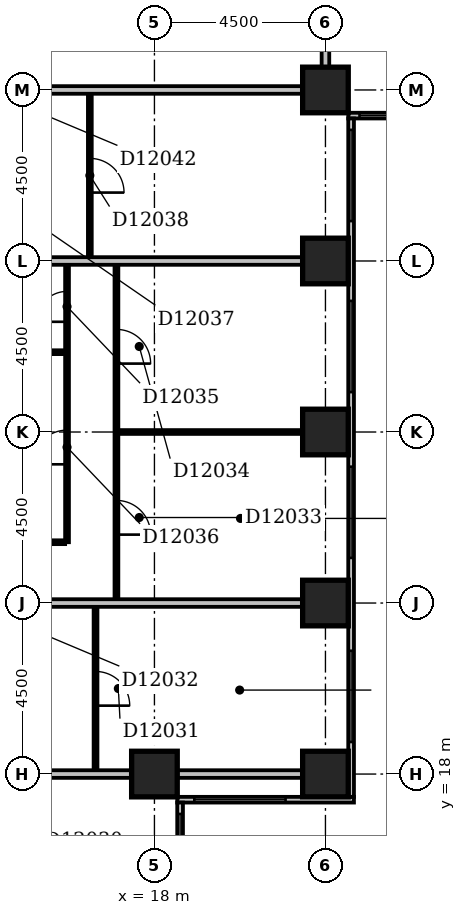
"""IFC4 building model, lengths in metres.
Left out: names, types, materials, properties, quantities, classifications, styles, units other than length and angle.
Written with IfcOpenShell. Run it as: python <this file> out.ifc"""

import sys

from ifc_helpers import new_model, si_unit, direction, frame, frame_2d, origin, origin_2d, place, context, subcontext, project, spatial, rectangle, extrude, element, fill, save


model = new_model("IFC4")
c1 = context("Model", 3, precision=1e-05, world=origin(), true_north=direction((0.0, 1.0)))
c2 = subcontext(c1, "Body", "Model", "MODEL_VIEW")
j1 = project(units=[si_unit("LENGTHUNIT", "METRE"), si_unit("PLANEANGLEUNIT", "RADIAN")], contexts=[c1])
p1 = place(None, origin())
s1 = spatial("IfcSite", under=j1, at=p1, CompositionType="ELEMENT")
p2 = place(p1, origin())
s2 = spatial("IfcBuilding", under=s1, at=p2, CompositionType="ELEMENT")
p3 = place(p2, frame((0.0, 0.0, 54.2)))
s3 = spatial("IfcBuildingStorey", under=s2, at=p3, CompositionType="ELEMENT", Elevation=54.2)
for number, where, z_axis, x_axis in (
    (1, (18.0, 18.0, -0.3), (0.0, 0.0, 1.0), (1.0, 0.0, 0.0)),
    (2, (22.5, 18.0, -0.3), (0.0, 0.0, 1.0), (1.0, 0.0, 0.0)),
    (3, (22.5, 22.5, -0.3), (0.0, 0.0, 1.0), (1.0, 0.0, 0.0)),
    (4, (22.5, 27.0, -0.3), (0.0, 0.0, 1.0), (1.0, 0.0, 0.0)),
    (5, (22.5, 31.5, -0.3), (0.0, 0.0, 1.0), (1.0, 0.0, 0.0)),
    (6, (22.5, 36.0, -0.3), (0.0, 0.0, 1.0), (1.0, 0.0, 0.0)),
):
    element("IfcColumn", number, at=place(p3, frame(where, z_axis=z_axis, x_axis=x_axis)), inside=s3, PredefinedType="COLUMN", context=c2, shape_type="SweptSolid", body=[
        extrude(rectangle(XDim=1.2, YDim=1.2, at=origin_2d()), origin(), (0.0, 0.0, 1.0), 3.6),
    ])
p4 = place(p3, frame((18.675, 8.4, 0.0), z_axis=(0.0, 0.0, 1.0), x_axis=(0.0, 1.0, 0.0)))
e7 = element("IfcWall", 7, at=p4, inside=s3, PredefinedType="STANDARD", context=c2, shape_type="SweptSolid", body=[
    extrude(rectangle(XDim=8.85, YDim=0.15, at=frame_2d((4.425, 0.0))), origin(), (0.0, 0.0, 1.0), 2.7),
])
p5 = place(p4, frame((1.461, 0.0, 0.6)))
e8 = element("IfcOpeningElement", 8, at=p5, cuts=e7, PredefinedType="OPENING", context=c2, shape_type="SweptSolid", body=[
    extrude(rectangle(XDim=0.45, YDim=1.8, at=frame_2d((0.225, 0.9))), frame((0.0, 0.087, 0.0), z_axis=(0.0, -1.0, 0.0), x_axis=(1.0, 0.0, 0.0)), (0.0, 0.0, 1.0), 0.174),
])
p6 = place(p4, frame((3.391, 0.0, 0.6)))
e9 = element("IfcOpeningElement", 9, at=p6, cuts=e7, PredefinedType="OPENING", context=c2, shape_type="SweptSolid", body=[
    extrude(rectangle(XDim=0.9, YDim=1.8, at=frame_2d((0.45, 0.9))), frame((0.0, 0.087, 0.0), z_axis=(0.0, -1.0, 0.0), x_axis=(1.0, 0.0, 0.0)), (0.0, 0.0, 1.0), 0.174),
])
p7 = place(p4, frame((6.15, 0.0, 0.6)))
e10 = element("IfcOpeningElement", 10, at=p7, cuts=e7, PredefinedType="OPENING", context=c2, shape_type="SweptSolid", body=[
    extrude(rectangle(XDim=2.4, YDim=1.8, at=frame_2d((1.2, 0.9))), frame((0.0, 0.087, 0.0), z_axis=(0.0, -1.0, 0.0), x_axis=(1.0, 0.0, 0.0)), (0.0, 0.0, 1.0), 0.174),
])
p8 = place(p3, frame((18.6, 17.325, 0.0), z_axis=(0.0, 0.0, 1.0), x_axis=(1.0, 0.0, 0.0)))
e11 = element("IfcWall", 11, at=p8, inside=s3, PredefinedType="STANDARD", context=c2, shape_type="SweptSolid", body=[
    extrude(rectangle(XDim=4.65, YDim=0.15, at=frame_2d((2.325, 0.0))), origin(), (0.0, 0.0, 1.0), 2.7),
])
p9 = place(p8, frame((0.45, 0.0, 0.6)))
e12 = element("IfcOpeningElement", 12, at=p9, cuts=e11, PredefinedType="OPENING", context=c2, shape_type="SweptSolid", body=[
    extrude(rectangle(XDim=2.4, YDim=1.8, at=frame_2d((1.2, 0.9))), frame((0.0, 0.087, 0.0), z_axis=(0.0, -1.0, 0.0), x_axis=(1.0, 0.0, 0.0)), (0.0, 0.0, 1.0), 0.174),
])
p10 = place(p3, frame((23.175, 17.4, 0.0), z_axis=(0.0, 0.0, 1.0), x_axis=(0.0, 1.0, 0.0)))
e13 = element("IfcWall", 13, at=p10, inside=s3, PredefinedType="STANDARD", context=c2, shape_type="SweptSolid", body=[
    extrude(rectangle(XDim=17.85, YDim=0.15, at=frame_2d((8.925, 0.0))), origin(), (0.0, 0.0, 1.0), 2.7),
])
p11 = place(p10, frame((1.444, 0.0, 0.6)))
e14 = element("IfcOpeningElement", 14, at=p11, cuts=e13, PredefinedType="OPENING", context=c2, shape_type="SweptSolid", body=[
    extrude(rectangle(XDim=2.4, YDim=1.8, at=frame_2d((1.2, 0.9))), frame((0.0, 0.087, 0.0), z_axis=(0.0, -1.0, 0.0), x_axis=(1.0, 0.0, 0.0)), (0.0, 0.0, 1.0), 0.174),
])
p12 = place(p10, frame((6.287, 0.0, 0.6)))
e15 = element("IfcOpeningElement", 15, at=p12, cuts=e13, PredefinedType="OPENING", context=c2, shape_type="SweptSolid", body=[
    extrude(rectangle(XDim=2.4, YDim=1.8, at=frame_2d((1.2, 0.9))), frame((0.0, 0.087, 0.0), z_axis=(0.0, -1.0, 0.0), x_axis=(1.0, 0.0, 0.0)), (0.0, 0.0, 1.0), 0.174),
])
p13 = place(p10, frame((10.65, 0.0, 0.6)))
e16 = element("IfcOpeningElement", 16, at=p13, cuts=e13, PredefinedType="OPENING", context=c2, shape_type="SweptSolid", body=[
    extrude(rectangle(XDim=2.4, YDim=1.8, at=frame_2d((1.2, 0.9))), frame((0.0, 0.087, 0.0), z_axis=(0.0, -1.0, 0.0), x_axis=(1.0, 0.0, 0.0)), (0.0, 0.0, 1.0), 0.174),
])
p14 = place(p10, frame((15.15, 0.0, 0.6)))
e17 = element("IfcOpeningElement", 17, at=p14, cuts=e13, PredefinedType="OPENING", context=c2, shape_type="SweptSolid", body=[
    extrude(rectangle(XDim=2.4, YDim=1.8, at=frame_2d((1.2, 0.9))), frame((0.0, 0.087, 0.0), z_axis=(0.0, -1.0, 0.0), x_axis=(1.0, 0.0, 0.0)), (0.0, 0.0, 1.0), 0.174),
])
p15 = place(p3, frame((23.1, 35.325, 0.0), z_axis=(0.0, 0.0, 1.0), x_axis=(1.0, 0.0, 0.0)))
e18 = element("IfcWall", 18, at=p15, inside=s3, PredefinedType="STANDARD", context=c2, shape_type="SweptSolid", body=[
    extrude(rectangle(XDim=45.15, YDim=0.15, at=frame_2d((22.575, 0.0))), origin(), (0.0, 0.0, 1.0), 2.7),
])
p16 = place(p15, frame((0.297, 0.0, 0.6)))
e19 = element("IfcOpeningElement", 19, at=p16, cuts=e18, PredefinedType="OPENING", context=c2, shape_type="SweptSolid", body=[
    extrude(rectangle(XDim=2.4, YDim=1.8, at=frame_2d((1.2, 0.9))), frame((0.0, 0.087, 0.0), z_axis=(0.0, -1.0, 0.0), x_axis=(1.0, 0.0, 0.0)), (0.0, 0.0, 1.0), 0.174),
])
p17 = place(p15, frame((4.95, 0.0, 0.6)))
e20 = element("IfcOpeningElement", 20, at=p17, cuts=e18, PredefinedType="OPENING", context=c2, shape_type="SweptSolid", body=[
    extrude(rectangle(XDim=2.4, YDim=1.8, at=frame_2d((1.2, 0.9))), frame((0.0, 0.087, 0.0), z_axis=(0.0, -1.0, 0.0), x_axis=(1.0, 0.0, 0.0)), (0.0, 0.0, 1.0), 0.174),
])
p18 = place(p15, frame((9.45, 0.0, 0.6)))
e21 = element("IfcOpeningElement", 21, at=p18, cuts=e18, PredefinedType="OPENING", context=c2, shape_type="SweptSolid", body=[
    extrude(rectangle(XDim=2.4, YDim=1.8, at=frame_2d((1.2, 0.9))), frame((0.0, 0.087, 0.0), z_axis=(0.0, -1.0, 0.0), x_axis=(1.0, 0.0, 0.0)), (0.0, 0.0, 1.0), 0.174),
])
p19 = place(p15, frame((13.95, 0.0, 0.6)))
e22 = element("IfcOpeningElement", 22, at=p19, cuts=e18, PredefinedType="OPENING", context=c2, shape_type="SweptSolid", body=[
    extrude(rectangle(XDim=2.4, YDim=1.8, at=frame_2d((1.2, 0.9))), frame((0.0, 0.087, 0.0), z_axis=(0.0, -1.0, 0.0), x_axis=(1.0, 0.0, 0.0)), (0.0, 0.0, 1.0), 0.174),
])
p20 = place(p15, frame((18.45, 0.0, 0.6)))
e23 = element("IfcOpeningElement", 23, at=p20, cuts=e18, PredefinedType="OPENING", context=c2, shape_type="SweptSolid", body=[
    extrude(rectangle(XDim=2.4, YDim=1.8, at=frame_2d((1.2, 0.9))), frame((0.0, 0.087, 0.0), z_axis=(0.0, -1.0, 0.0), x_axis=(1.0, 0.0, 0.0)), (0.0, 0.0, 1.0), 0.174),
])
p21 = place(p15, frame((23.97, 0.0, 0.6)))
e24 = element("IfcOpeningElement", 24, at=p21, cuts=e18, PredefinedType="OPENING", context=c2, shape_type="SweptSolid", body=[
    extrude(rectangle(XDim=1.5, YDim=1.8, at=frame_2d((0.75, 0.9))), frame((0.0, 0.087, 0.0), z_axis=(0.0, -1.0, 0.0), x_axis=(1.0, 0.0, 0.0)), (0.0, 0.0, 1.0), 0.174),
])
p22 = place(p15, frame((27.45, 0.0, 0.6)))
e25 = element("IfcOpeningElement", 25, at=p22, cuts=e18, PredefinedType="OPENING", context=c2, shape_type="SweptSolid", body=[
    extrude(rectangle(XDim=2.4, YDim=1.8, at=frame_2d((1.2, 0.9))), frame((0.0, 0.087, 0.0), z_axis=(0.0, -1.0, 0.0), x_axis=(1.0, 0.0, 0.0)), (0.0, 0.0, 1.0), 0.174),
])
p23 = place(p15, frame((32.403, 0.0, 0.6)))
e26 = element("IfcOpeningElement", 26, at=p23, cuts=e18, PredefinedType="OPENING", context=c2, shape_type="SweptSolid", body=[
    extrude(rectangle(XDim=2.1, YDim=1.8, at=frame_2d((1.05, 0.9))), frame((0.0, 0.087, 0.0), z_axis=(0.0, -1.0, 0.0), x_axis=(1.0, 0.0, 0.0)), (0.0, 0.0, 1.0), 0.174),
])
p24 = place(p15, frame((36.45, 0.0, 0.6)))
e27 = element("IfcOpeningElement", 27, at=p24, cuts=e18, PredefinedType="OPENING", context=c2, shape_type="SweptSolid", body=[
    extrude(rectangle(XDim=2.4, YDim=1.8, at=frame_2d((1.2, 0.9))), frame((0.0, 0.087, 0.0), z_axis=(0.0, -1.0, 0.0), x_axis=(1.0, 0.0, 0.0)), (0.0, 0.0, 1.0), 0.174),
])
p25 = place(p15, frame((40.95, 0.0, 0.6)))
e28 = element("IfcOpeningElement", 28, at=p25, cuts=e18, PredefinedType="OPENING", context=c2, shape_type="SweptSolid", body=[
    extrude(rectangle(XDim=2.4, YDim=1.8, at=frame_2d((1.2, 0.9))), frame((0.0, 0.087, 0.0), z_axis=(0.0, -1.0, 0.0), x_axis=(1.0, 0.0, 0.0)), (0.0, 0.0, 1.0), 0.174),
])
p26 = place(p3, frame((9.1, 18.0, 0.0), z_axis=(0.0, 0.0, 1.0), x_axis=(1.0, 0.0, 0.0)))
e29 = element("IfcWall", 29, at=p26, inside=s3, PredefinedType="PARTITIONING", context=c2, shape_type="SweptSolid", body=[
    extrude(rectangle(XDim=8.3, YDim=0.2, at=frame_2d((4.15, 0.0))), origin(), (0.0, 0.0, 1.0), 2.6),
])
p27 = place(p3, frame((18.6, 18.0, 0.0), z_axis=(0.0, 0.0, 1.0), x_axis=(1.0, 0.0, 0.0)))
e30 = element("IfcWall", 30, at=p27, inside=s3, PredefinedType="PARTITIONING", context=c2, shape_type="SweptSolid", body=[
    extrude(rectangle(XDim=3.3, YDim=0.2, at=frame_2d((1.65, 0.0))), origin(), (0.0, 0.0, 1.0), 2.7),
])
p28 = place(p3, frame((16.45, 18.1, 0.0), z_axis=(0.0, 0.0, 1.0), x_axis=(0.0, 1.0, 0.0)))
e31 = element("IfcWall", 31, at=p28, inside=s3, PredefinedType="PARTITIONING", context=c2, shape_type="SweptSolid", body=[
    extrude(rectangle(XDim=4.3, YDim=0.1, at=frame_2d((2.15, 0.0))), origin(), (0.0, 0.0, 1.0), 3.3),
])
p29 = place(p28, frame((1.7, 0.0, 0.0)))
e32 = element("IfcOpeningElement", 32, at=p29, cuts=e31, PredefinedType="OPENING", context=c2, shape_type="SweptSolid", body=[
    extrude(rectangle(XDim=0.9, YDim=2.1, at=frame_2d((0.45, 1.05))), frame((0.0, 0.062, 0.0), z_axis=(0.0, -1.0, 0.0), x_axis=(1.0, 0.0, 0.0)), (0.0, 0.0, 1.0), 0.124),
])
p30 = place(p3, frame((9.1, 22.5, 0.0), z_axis=(0.0, 0.0, 1.0), x_axis=(1.0, 0.0, 0.0)))
e33 = element("IfcWall", 33, at=p30, inside=s3, PredefinedType="PARTITIONING", context=c2, shape_type="SweptSolid", body=[
    extrude(rectangle(XDim=12.8, YDim=0.2, at=frame_2d((6.4, 0.0))), origin(), (0.0, 0.0, 1.0), 3.3),
])
p31 = place(p3, frame((17.0, 22.6, 0.0), z_axis=(0.0, 0.0, 1.0), x_axis=(0.0, 1.0, 0.0)))
e34 = element("IfcWall", 34, at=p31, inside=s3, PredefinedType="PARTITIONING", context=c2, shape_type="SweptSolid", body=[
    extrude(rectangle(XDim=8.8, YDim=0.1, at=frame_2d((4.4, 0.0))), origin(), (0.0, 0.0, 1.0), 3.3),
])
p32 = place(p31, frame((1.7, 0.0, 0.0)))
e35 = element("IfcOpeningElement", 35, at=p32, cuts=e34, PredefinedType="OPENING", context=c2, shape_type="SweptSolid", body=[
    extrude(rectangle(XDim=0.9, YDim=2.1, at=frame_2d((0.45, 1.05))), frame((0.0, 0.062, 0.0), z_axis=(0.0, -1.0, 0.0), x_axis=(1.0, 0.0, 0.0)), (0.0, 0.0, 1.0), 0.124),
])
p33 = place(p31, frame((6.2, 0.0, 0.0)))
e36 = element("IfcOpeningElement", 36, at=p33, cuts=e34, PredefinedType="OPENING", context=c2, shape_type="SweptSolid", body=[
    extrude(rectangle(XDim=0.9, YDim=2.1, at=frame_2d((0.45, 1.05))), frame((0.0, 0.062, 0.0), z_axis=(0.0, -1.0, 0.0), x_axis=(1.0, 0.0, 0.0)), (0.0, 0.0, 1.0), 0.124),
])
p34 = place(p3, frame((9.1, 24.1, 0.0), z_axis=(0.0, 0.0, 1.0), x_axis=(1.0, 0.0, 0.0)))
e37 = element("IfcWall", 37, at=p34, inside=s3, PredefinedType="PARTITIONING", context=c2, shape_type="SweptSolid", body=[
    extrude(rectangle(XDim=6.55, YDim=0.1, at=frame_2d((3.275, 0.0))), origin(), (0.0, 0.0, 1.0), 3.3),
])
p35 = place(p3, frame((15.7, 24.1, 0.0), z_axis=(0.0, 0.0, 1.0), x_axis=(0.0, 1.0, 0.0)))
e38 = element("IfcWall", 38, at=p35, inside=s3, PredefinedType="PARTITIONING", context=c2, shape_type="SweptSolid", body=[
    extrude(rectangle(XDim=7.3, YDim=0.1, at=frame_2d((3.65, 0.0))), origin(), (0.0, 0.0, 1.0), 3.3),
])
p36 = place(p35, frame((5.8, 0.0, 0.0)))
e39 = element("IfcOpeningElement", 39, at=p36, cuts=e38, PredefinedType="OPENING", context=c2, shape_type="SweptSolid", body=[
    extrude(rectangle(XDim=0.8, YDim=2.1, at=frame_2d((0.4, 1.05))), frame((0.0, 0.062, 0.0), z_axis=(0.0, -1.0, 0.0), x_axis=(1.0, 0.0, 0.0)), (0.0, 0.0, 1.0), 0.124),
])
p37 = place(p35, frame((2.05, 0.0, 0.0)))
e40 = element("IfcOpeningElement", 40, at=p37, cuts=e38, PredefinedType="OPENING", context=c2, shape_type="SweptSolid", body=[
    extrude(rectangle(XDim=0.9, YDim=2.1, at=frame_2d((0.45, 1.05))), frame((0.0, 0.062, 0.0), z_axis=(0.0, -1.0, 0.0), x_axis=(1.0, 0.0, 0.0)), (0.0, 0.0, 1.0), 0.124),
])
p38 = place(p3, frame((17.05, 27.0, 0.0), z_axis=(0.0, 0.0, 1.0), x_axis=(1.0, 0.0, 0.0)))
e41 = element("IfcWall", 41, at=p38, inside=s3, PredefinedType="PARTITIONING", context=c2, shape_type="SweptSolid", body=[
    extrude(rectangle(XDim=4.85, YDim=0.1, at=frame_2d((2.425, 0.0))), origin(), (0.0, 0.0, 1.0), 2.7),
])
p39 = place(p3, frame((9.1, 29.1, 0.0), z_axis=(0.0, 0.0, 1.0), x_axis=(1.0, 0.0, 0.0)))
e42 = element("IfcWall", 42, at=p39, inside=s3, PredefinedType="PLUMBINGWALL", context=c2, shape_type="SweptSolid", body=[
    extrude(rectangle(XDim=6.55, YDim=0.1, at=frame_2d((3.275, 0.0))), origin(), (0.0, 0.0, 1.0), 3.3),
])
p40 = place(p3, frame((9.1, 31.5, 0.0), z_axis=(0.0, 0.0, 1.0), x_axis=(1.0, 0.0, 0.0)))
e43 = element("IfcWall", 43, at=p40, inside=s3, PredefinedType="PARTITIONING", context=c2, shape_type="SweptSolid", body=[
    extrude(rectangle(XDim=12.8, YDim=0.2, at=frame_2d((6.4, 0.0))), origin(), (0.0, 0.0, 1.0), 3.3),
])
p41 = place(p3, frame((16.3, 31.6, 0.0), z_axis=(0.0, 0.0, 1.0), x_axis=(0.0, 1.0, 0.0)))
e44 = element("IfcWall", 44, at=p41, inside=s3, PredefinedType="PARTITIONING", context=c2, shape_type="SweptSolid", body=[
    extrude(rectangle(XDim=4.3, YDim=0.1, at=frame_2d((2.15, 0.0))), origin(), (0.0, 0.0, 1.0), 3.3),
])
p42 = place(p41, frame((1.7, 0.0, 0.0)))
e45 = element("IfcOpeningElement", 45, at=p42, cuts=e44, PredefinedType="OPENING", context=c2, shape_type="SweptSolid", body=[
    extrude(rectangle(XDim=0.9, YDim=2.1, at=frame_2d((0.45, 1.05))), frame((0.0, 0.062, 0.0), z_axis=(0.0, -1.0, 0.0), x_axis=(1.0, 0.0, 0.0)), (0.0, 0.0, 1.0), 0.124),
])
p43 = place(p3, frame((9.1, 36.0, 0.0), z_axis=(0.0, 0.0, 1.0), x_axis=(1.0, 0.0, 0.0)))
e46 = element("IfcWall", 46, at=p43, inside=s3, PredefinedType="PARTITIONING", context=c2, shape_type="SweptSolid", body=[
    extrude(rectangle(XDim=12.8, YDim=0.2, at=frame_2d((6.4, 0.0))), origin(), (0.0, 0.0, 1.0), 2.4),
])
p44 = place(p3, frame((22.5, 36.6, 0.0), z_axis=(0.0, 0.0, 1.0), x_axis=(0.0, 1.0, 0.0)))
e47 = element("IfcWall", 47, at=p44, inside=s3, PredefinedType="PARTITIONING", context=c2, shape_type="SweptSolid", body=[
    extrude(rectangle(XDim=12.8, YDim=0.2, at=frame_2d((6.4, 0.0))), origin(), (0.0, 0.0, 1.0), 3.3),
])
p45 = place(p7, origin())
e48 = element("IfcWindow", 48, at=p45, inside=s3, PartitioningType="SINGLE_PANEL", PredefinedType="WINDOW", context=c2, shape_type="SweptSolid", body=[
    extrude(rectangle(XDim=2.4, YDim=1.8, at=frame_2d((1.2, 0.9))), frame((0.0, 0.03, 0.0), z_axis=(0.0, -1.0, 0.0), x_axis=(1.0, 0.0, 0.0)), (0.0, 0.0, 1.0), 0.06),
])
fill(e10, e48)
p46 = place(p9, origin())
e49 = element("IfcWindow", 49, at=p46, inside=s3, PartitioningType="SINGLE_PANEL", PredefinedType="WINDOW", context=c2, shape_type="SweptSolid", body=[
    extrude(rectangle(XDim=2.4, YDim=1.8, at=frame_2d((1.2, 0.9))), frame((0.0, 0.03, 0.0), z_axis=(0.0, -1.0, 0.0), x_axis=(1.0, 0.0, 0.0)), (0.0, 0.0, 1.0), 0.06),
])
fill(e12, e49)
p47 = place(p11, origin())
e50 = element("IfcWindow", 50, at=p47, inside=s3, PartitioningType="SINGLE_PANEL", PredefinedType="WINDOW", context=c2, shape_type="SweptSolid", body=[
    extrude(rectangle(XDim=2.4, YDim=1.8, at=frame_2d((1.2, 0.9))), frame((0.0, 0.03, 0.0), z_axis=(0.0, -1.0, 0.0), x_axis=(1.0, 0.0, 0.0)), (0.0, 0.0, 1.0), 0.06),
])
fill(e14, e50)
p48 = place(p12, origin())
e51 = element("IfcWindow", 51, at=p48, inside=s3, PartitioningType="SINGLE_PANEL", PredefinedType="WINDOW", context=c2, shape_type="SweptSolid", body=[
    extrude(rectangle(XDim=2.4, YDim=1.8, at=frame_2d((1.2, 0.9))), frame((0.0, 0.03, 0.0), z_axis=(0.0, -1.0, 0.0), x_axis=(1.0, 0.0, 0.0)), (0.0, 0.0, 1.0), 0.06),
])
fill(e15, e51)
p49 = place(p13, origin())
e52 = element("IfcWindow", 52, at=p49, inside=s3, PartitioningType="SINGLE_PANEL", PredefinedType="WINDOW", context=c2, shape_type="SweptSolid", body=[
    extrude(rectangle(XDim=2.4, YDim=1.8, at=frame_2d((1.2, 0.9))), frame((0.0, 0.03, 0.0), z_axis=(0.0, -1.0, 0.0), x_axis=(1.0, 0.0, 0.0)), (0.0, 0.0, 1.0), 0.06),
])
fill(e16, e52)
p50 = place(p14, origin())
e53 = element("IfcWindow", 53, at=p50, inside=s3, PartitioningType="SINGLE_PANEL", PredefinedType="WINDOW", context=c2, shape_type="SweptSolid", body=[
    extrude(rectangle(XDim=2.4, YDim=1.8, at=frame_2d((1.2, 0.9))), frame((0.0, 0.03, 0.0), z_axis=(0.0, -1.0, 0.0), x_axis=(1.0, 0.0, 0.0)), (0.0, 0.0, 1.0), 0.06),
])
fill(e17, e53)
p51 = place(p16, origin())
e54 = element("IfcWindow", 54, at=p51, inside=s3, PartitioningType="SINGLE_PANEL", PredefinedType="WINDOW", context=c2, shape_type="SweptSolid", body=[
    extrude(rectangle(XDim=2.4, YDim=1.8, at=frame_2d((1.2, 0.9))), frame((0.0, 0.03, 0.0), z_axis=(0.0, -1.0, 0.0), x_axis=(1.0, 0.0, 0.0)), (0.0, 0.0, 1.0), 0.06),
])
fill(e19, e54)
p52 = place(p29, frame((0.9, 0.0, 0.0), z_axis=(0.0, 0.0, 1.0), x_axis=(-1.0, 0.0, 0.0)))
e55 = element("IfcDoor", 55, at=p52, inside=s3, OperationType="SINGLE_SWING_RIGHT", PredefinedType="DOOR", context=c2, shape_type="SweptSolid", body=[
    extrude(rectangle(XDim=0.9, YDim=2.1, at=frame_2d((0.45, 1.05))), frame((0.0, 0.025, 0.0), z_axis=(0.0, -1.0, 0.0), x_axis=(1.0, 0.0, 0.0)), (0.0, 0.0, 1.0), 0.05),
])
fill(e32, e55)
p53 = place(p32, frame((0.9, 0.0, 0.0), z_axis=(0.0, 0.0, 1.0), x_axis=(-1.0, 0.0, 0.0)))
e56 = element("IfcDoor", 56, at=p53, inside=s3, OperationType="SINGLE_SWING_RIGHT", PredefinedType="DOOR", context=c2, shape_type="SweptSolid", body=[
    extrude(rectangle(XDim=0.9, YDim=2.1, at=frame_2d((0.45, 1.05))), frame((0.0, 0.025, 0.0), z_axis=(0.0, -1.0, 0.0), x_axis=(1.0, 0.0, 0.0)), (0.0, 0.0, 1.0), 0.05),
])
fill(e35, e56)
p54 = place(p33, frame((0.9, 0.0, 0.0), z_axis=(0.0, 0.0, 1.0), x_axis=(-1.0, 0.0, 0.0)))
e57 = element("IfcDoor", 57, at=p54, inside=s3, OperationType="SINGLE_SWING_RIGHT", PredefinedType="DOOR", context=c2, shape_type="SweptSolid", body=[
    extrude(rectangle(XDim=0.9, YDim=2.1, at=frame_2d((0.45, 1.05))), frame((0.0, 0.025, 0.0), z_axis=(0.0, -1.0, 0.0), x_axis=(1.0, 0.0, 0.0)), (0.0, 0.0, 1.0), 0.05),
])
fill(e36, e57)
p55 = place(p36, origin())
e58 = element("IfcDoor", 58, at=p55, inside=s3, OperationType="SINGLE_SWING_LEFT", PredefinedType="DOOR", context=c2, shape_type="SweptSolid", body=[
    extrude(rectangle(XDim=0.8, YDim=2.1, at=frame_2d((0.4, 1.05))), frame((0.0, 0.025, 0.0), z_axis=(0.0, -1.0, 0.0), x_axis=(1.0, 0.0, 0.0)), (0.0, 0.0, 1.0), 0.05),
])
fill(e39, e58)
p56 = place(p37, origin())
e59 = element("IfcDoor", 59, at=p56, inside=s3, OperationType="SINGLE_SWING_LEFT", PredefinedType="DOOR", context=c2, shape_type="SweptSolid", body=[
    extrude(rectangle(XDim=0.9, YDim=2.1, at=frame_2d((0.45, 1.05))), frame((0.0, 0.025, 0.0), z_axis=(0.0, -1.0, 0.0), x_axis=(1.0, 0.0, 0.0)), (0.0, 0.0, 1.0), 0.05),
])
fill(e40, e59)
p57 = place(p42, frame((0.9, 0.0, 0.0), z_axis=(0.0, 0.0, 1.0), x_axis=(-1.0, 0.0, 0.0)))
e60 = element("IfcDoor", 60, at=p57, inside=s3, OperationType="SINGLE_SWING_RIGHT", PredefinedType="DOOR", context=c2, shape_type="SweptSolid", body=[
    extrude(rectangle(XDim=0.9, YDim=2.1, at=frame_2d((0.45, 1.05))), frame((0.0, 0.025, 0.0), z_axis=(0.0, -1.0, 0.0), x_axis=(1.0, 0.0, 0.0)), (0.0, 0.0, 1.0), 0.05),
])
fill(e45, e60)
save(model, sys.argv[1])
